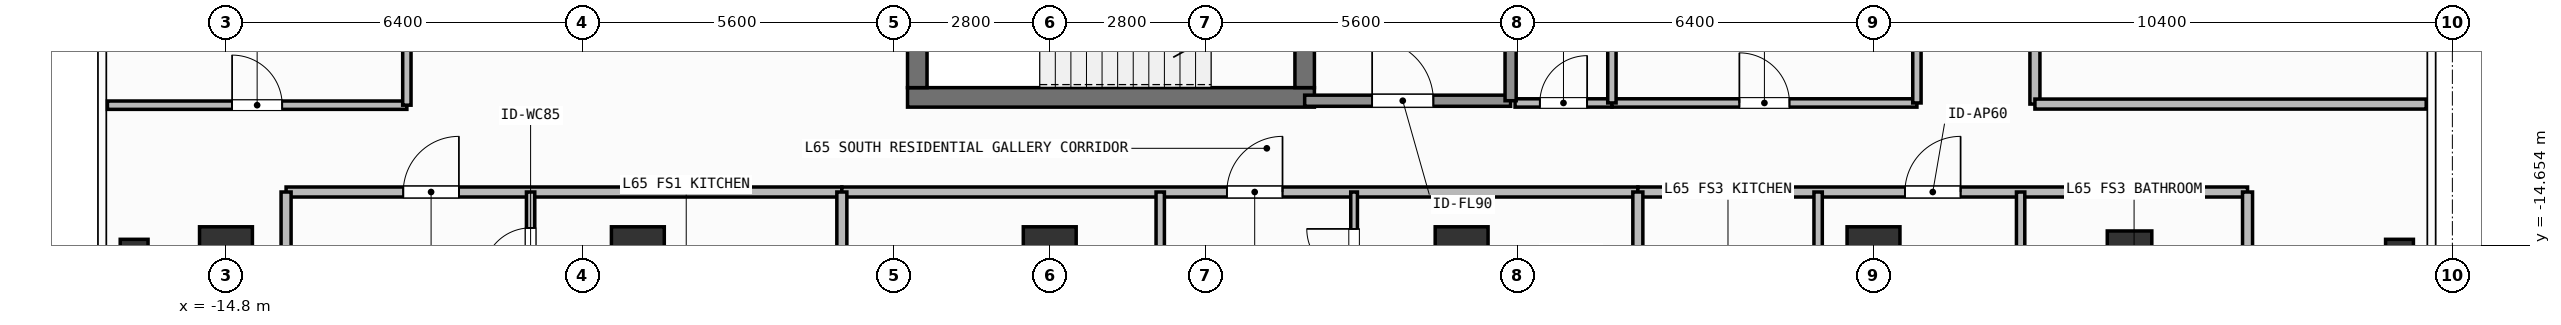
"""IFC4 building model, lengths in metres.
Left out: names, types, materials, properties, quantities, classifications, styles, units other than length and angle.
Written with IfcOpenShell. Run it as: python <this file> out.ifc"""

import sys

from ifc_helpers import new_model, si_unit, direction, frame, frame_2d, origin, origin_2d, place, context, subcontext, project, spatial, rectangle, hollow_rectangle, extrude, element, fill, save


model = new_model("IFC4")
c1 = context("Model", 3, precision=1e-05, world=origin(), true_north=direction((0.0, 1.0)))
c2 = subcontext(c1, "Body", "Model", "MODEL_VIEW")
j1 = project(units=[si_unit("LENGTHUNIT", "METRE"), si_unit("PLANEANGLEUNIT", "RADIAN")], contexts=[c1])
p1 = place(None, origin())
s1 = spatial("IfcSite", under=j1, at=p1, CompositionType="ELEMENT")
p2 = place(p1, origin())
s2 = spatial("IfcBuilding", under=s1, at=p2, CompositionType="ELEMENT")
p3 = place(p2, frame((0.0, 0.0, 266.4)))
s3 = spatial("IfcBuildingStorey", under=s2, at=p3, CompositionType="ELEMENT", Elevation=266.4)
p4 = place(p3, frame((-2.555, -12.0, 0.0), z_axis=(0.0, 0.0, 1.0), x_axis=(1.0, 0.0, 0.0)))
e1 = element("IfcWall", 1, at=p4, inside=s3, PredefinedType="SHEAR", context=c2, shape_type="SweptSolid", body=[
    extrude(rectangle(XDim=7.31, YDim=0.35, at=frame_2d((3.655, 0.0))), origin(), (0.0, 0.0, 1.0), 3.9),
])
p5 = place(p3, frame((-2.38, -11.825, 0.0), z_axis=(0.0, 0.0, 1.0), x_axis=(0.0, 1.0, 0.0)))
e2 = element("IfcWall", 2, at=p5, inside=s3, PredefinedType="SHEAR", context=c2, shape_type="SweptSolid", body=[
    extrude(rectangle(XDim=2.925, YDim=0.35, at=frame_2d((1.462, 0.0))), origin(), (0.0, 0.0, 1.0), 3.9),
])
p6 = place(p3, frame((4.58, -8.9, 0.0), z_axis=(0.0, 0.0, 1.0), x_axis=(0.0, -1.0, 0.0)))
e3 = element("IfcWall", 3, at=p6, inside=s3, PredefinedType="SHEAR", context=c2, shape_type="SweptSolid", body=[
    extrude(rectangle(XDim=2.925, YDim=0.35, at=frame_2d((1.462, 0.0))), origin(), (0.0, 0.0, 1.0), 3.9),
])
p7 = place(p6, frame((0.913, 0.0, 0.0)))
e4 = element("IfcOpeningElement", 4, at=p7, cuts=e3, PredefinedType="OPENING", context=c2, shape_type="SweptSolid", body=[
    extrude(rectangle(XDim=1.1, YDim=2.15, at=frame_2d((0.55, 1.075))), frame((0.0, 0.185, 0.0), z_axis=(0.0, -1.0, 0.0), x_axis=(1.0, 0.0, 0.0)), (0.0, 0.0, 1.0), 0.37),
])
for number, where, z_axis, x_axis in (
    (5, (-14.8, -14.8, 0.0), (0.0, 0.0, 1.0), (1.0, 0.0, 0.0)),
    (6, (-7.4, -14.8, 0.0), (0.0, 0.0, 1.0), (1.0, 0.0, 0.0)),
    (7, (0.0, -14.8, 0.0), (0.0, 0.0, 1.0), (1.0, 0.0, 0.0)),
    (8, (7.4, -14.8, 0.0), (0.0, 0.0, 1.0), (1.0, 0.0, 0.0)),
    (9, (14.8, -14.8, 0.0), (0.0, 0.0, 1.0), (1.0, 0.0, 0.0)),
):
    element("IfcColumn", number, at=place(p3, frame(where, z_axis=z_axis, x_axis=x_axis)), inside=s3, PredefinedType="COLUMN", context=c2, shape_type="SweptSolid", body=[
        extrude(rectangle(XDim=0.95, YDim=0.95, at=origin_2d()), origin(), (0.0, 0.0, 1.0), 3.9),
    ])
p8 = place(p3, frame((19.4, -14.8, 0.0), z_axis=(0.0, 0.0, 1.0), x_axis=(1.0, 0.0, 0.0)))
e10 = element("IfcColumn", 10, at=p8, inside=s3, PredefinedType="COLUMN", context=c2, shape_type="SweptSolid", body=[
    extrude(hollow_rectangle(XDim=0.8, YDim=0.8, WallThickness=0.036, at=origin_2d()), origin(), (0.0, 0.0, 1.0), 3.9),
])
for number, where, z_axis, x_axis in (
    (11, (-16.45, -14.8, 0.0), (0.0, 0.0, 1.0), (1.0, 0.0, 0.0)),
    (12, (24.25, -14.8, 0.0), (0.0, 0.0, 1.0), (1.0, 0.0, 0.0)),
):
    element("IfcColumn", number, at=place(p3, frame(where, z_axis=z_axis, x_axis=x_axis)), inside=s3, PredefinedType="COLUMN", context=c2, shape_type="SweptSolid", body=[
        extrude(hollow_rectangle(XDim=0.5, YDim=0.5, WallThickness=0.025, at=origin_2d()), origin(), (0.0, 0.0, 1.0), 3.9),
    ])
p9 = place(p3, frame((4.58, -12.06, 0.0), z_axis=(0.0, 0.0, 1.0), x_axis=(1.0, 0.0, 0.0)))
e13 = element("IfcWall", 13, at=p9, inside=s3, PredefinedType="SOLIDWALL", context=c2, shape_type="SweptSolid", body=[
    extrude(rectangle(XDim=3.7, YDim=0.2, at=frame_2d((1.85, 0.0))), origin(), (0.0, 0.0, 1.0), 3.68),
])
p10 = place(p9, frame((1.212, 0.0, 0.0)))
e14 = element("IfcOpeningElement", 14, at=p10, cuts=e13, PredefinedType="OPENING", context=c2, shape_type="SweptSolid", body=[
    extrude(rectangle(XDim=1.1, YDim=2.15, at=frame_2d((0.55, 1.075))), frame((0.0, 0.11, 0.0), z_axis=(0.0, -1.0, 0.0), x_axis=(1.0, 0.0, 0.0)), (0.0, 0.0, 1.0), 0.22),
])
p11 = place(p3, frame((8.36, -12.1, 0.0), z_axis=(0.0, 0.0, 1.0), x_axis=(1.0, 0.0, 0.0)))
e15 = element("IfcWall", 15, at=p11, inside=s3, PredefinedType="PARTITIONING", context=c2, shape_type="SweptSolid", body=[
    extrude(rectangle(XDim=1.74, YDim=0.15, at=frame_2d((0.87, 0.0))), origin(), (0.0, 0.0, 1.0), 3.68),
])
p12 = place(p11, frame((0.445, 0.0, 0.0)))
e16 = element("IfcOpeningElement", 16, at=p12, cuts=e15, PredefinedType="OPENING", context=c2, shape_type="SweptSolid", body=[
    extrude(rectangle(XDim=0.85, YDim=2.1, at=frame_2d((0.425, 1.05))), frame((0.0, 0.085, 0.0), z_axis=(0.0, -1.0, 0.0), x_axis=(1.0, 0.0, 0.0)), (0.0, 0.0, 1.0), 0.17),
])
p13 = place(p3, frame((10.1, -12.1, 0.0), z_axis=(0.0, 0.0, 1.0), x_axis=(1.0, 0.0, 0.0)))
e17 = element("IfcWall", 17, at=p13, inside=s3, PredefinedType="PARTITIONING", context=c2, shape_type="SweptSolid", body=[
    extrude(rectangle(XDim=5.48, YDim=0.15, at=frame_2d((2.74, 0.0))), origin(), (0.0, 0.0, 1.0), 3.68),
])
p14 = place(p13, frame((2.29, 0.0, 0.0)))
e18 = element("IfcOpeningElement", 18, at=p14, cuts=e17, PredefinedType="OPENING", context=c2, shape_type="SweptSolid", body=[
    extrude(rectangle(XDim=0.9, YDim=2.1, at=frame_2d((0.45, 1.05))), frame((0.0, 0.085, 0.0), z_axis=(0.0, -1.0, 0.0), x_axis=(1.0, 0.0, 0.0)), (0.0, 0.0, 1.0), 0.17),
])
p15 = place(p3, frame((-13.72, -13.7, 0.0), z_axis=(0.0, 0.0, 1.0), x_axis=(1.0, 0.0, 0.0)))
e19 = element("IfcWall", 19, at=p15, inside=s3, PredefinedType="PARTITIONING", context=c2, shape_type="SweptSolid", body=[
    extrude(rectangle(XDim=9.985, YDim=0.18, at=frame_2d((4.992, 0.0))), origin(), (0.0, 0.0, 1.0), 3.68),
])
p16 = place(p15, frame((2.105, 0.0, 0.0)))
e20 = element("IfcOpeningElement", 20, at=p16, cuts=e19, PredefinedType="OPENING", context=c2, shape_type="SweptSolid", body=[
    extrude(rectangle(XDim=1.0, YDim=2.2, at=frame_2d((0.5, 1.1))), frame((0.0, 0.1, 0.0), z_axis=(0.0, -1.0, 0.0), x_axis=(1.0, 0.0, 0.0)), (0.0, 0.0, 1.0), 0.2),
])
p17 = place(p3, frame((-9.327, -15.839, 0.0), z_axis=(0.0, 0.0, 1.0), x_axis=(0.0, 1.0, 0.0)))
e21 = element("IfcWall", 21, at=p17, inside=s3, PredefinedType="PARTITIONING", context=c2, shape_type="SweptSolid", body=[
    extrude(rectangle(XDim=2.139, YDim=0.15, at=frame_2d((1.07, 0.0))), origin(), (0.0, 0.0, 1.0), 3.68),
])
p18 = place(p17, frame((0.645, 0.0, 0.0)))
e22 = element("IfcOpeningElement", 22, at=p18, cuts=e21, PredefinedType="OPENING", context=c2, shape_type="SweptSolid", body=[
    extrude(rectangle(XDim=0.85, YDim=2.1, at=frame_2d((0.425, 1.05))), frame((0.0, 0.085, 0.0), z_axis=(0.0, -1.0, 0.0), x_axis=(1.0, 0.0, 0.0)), (0.0, 0.0, 1.0), 0.17),
])
p19 = place(p3, frame((-3.735, -13.7, 0.0), z_axis=(0.0, 0.0, 1.0), x_axis=(1.0, 0.0, 0.0)))
e23 = element("IfcWall", 23, at=p19, inside=s3, PredefinedType="PARTITIONING", context=c2, shape_type="SweptSolid", body=[
    extrude(rectangle(XDim=14.301, YDim=0.18, at=frame_2d((7.15, 0.0))), origin(), (0.0, 0.0, 1.0), 3.68),
])
p20 = place(p19, frame((6.917, 0.0, 0.0)))
e24 = element("IfcOpeningElement", 24, at=p20, cuts=e23, PredefinedType="OPENING", context=c2, shape_type="SweptSolid", body=[
    extrude(rectangle(XDim=1.0, YDim=2.2, at=frame_2d((0.5, 1.1))), frame((0.0, 0.1, 0.0), z_axis=(0.0, -1.0, 0.0), x_axis=(1.0, 0.0, 0.0)), (0.0, 0.0, 1.0), 0.2),
])
p21 = place(p3, frame((1.985, -17.524, 0.0), z_axis=(0.0, 0.0, 1.0), x_axis=(0.0, 1.0, 0.0)))
e25 = element("IfcWall", 25, at=p21, inside=s3, PredefinedType="PARTITIONING", context=c2, shape_type="SweptSolid", body=[
    extrude(rectangle(XDim=3.824, YDim=0.15, at=frame_2d((1.912, 0.0))), origin(), (0.0, 0.0, 1.0), 3.68),
])
p22 = place(p21, frame((1.398, 0.0, 0.0)))
e26 = element("IfcOpeningElement", 26, at=p22, cuts=e25, PredefinedType="OPENING", context=c2, shape_type="SweptSolid", body=[
    extrude(rectangle(XDim=0.85, YDim=2.1, at=frame_2d((0.425, 1.05))), frame((0.0, 0.085, 0.0), z_axis=(0.0, -1.0, 0.0), x_axis=(1.0, 0.0, 0.0)), (0.0, 0.0, 1.0), 0.17),
])
p23 = place(p3, frame((5.468, -15.876, 0.0), z_axis=(0.0, 0.0, 1.0), x_axis=(0.0, 1.0, 0.0)))
e27 = element("IfcWall", 27, at=p23, inside=s3, PredefinedType="PARTITIONING", context=c2, shape_type="SweptSolid", body=[
    extrude(rectangle(XDim=2.176, YDim=0.12, at=frame_2d((1.088, 0.0))), origin(), (0.0, 0.0, 1.0), 3.68),
])
p24 = place(p23, frame((0.663, 0.0, 0.0)))
e28 = element("IfcOpeningElement", 28, at=p24, cuts=e27, PredefinedType="OPENING", context=c2, shape_type="SweptSolid", body=[
    extrude(rectangle(XDim=0.85, YDim=2.1, at=frame_2d((0.425, 1.05))), frame((0.0, 0.07, 0.0), z_axis=(0.0, -1.0, 0.0), x_axis=(1.0, 0.0, 0.0)), (0.0, 0.0, 1.0), 0.14),
])
p25 = place(p3, frame((10.566, -13.7, 0.0), z_axis=(0.0, 0.0, 1.0), x_axis=(1.0, 0.0, 0.0)))
e29 = element("IfcWall", 29, at=p25, inside=s3, PredefinedType="PARTITIONING", context=c2, shape_type="SweptSolid", body=[
    extrude(rectangle(XDim=10.954, YDim=0.18, at=frame_2d((5.477, 0.0))), origin(), (0.0, 0.0, 1.0), 3.68),
])
p26 = place(p25, frame((4.799, 0.0, 0.0)))
e30 = element("IfcOpeningElement", 30, at=p26, cuts=e29, PredefinedType="OPENING", context=c2, shape_type="SweptSolid", body=[
    extrude(rectangle(XDim=1.0, YDim=2.2, at=frame_2d((0.5, 1.1))), frame((0.0, 0.1, 0.0), z_axis=(0.0, -1.0, 0.0), x_axis=(1.0, 0.0, 0.0)), (0.0, 0.0, 1.0), 0.2),
])
p27 = place(p3, frame((13.805, -17.219, 0.0), z_axis=(0.0, 0.0, 1.0), x_axis=(0.0, 1.0, 0.0)))
e31 = element("IfcWall", 31, at=p27, inside=s3, PredefinedType="PARTITIONING", context=c2, shape_type="SweptSolid", body=[
    extrude(rectangle(XDim=3.519, YDim=0.15, at=frame_2d((1.76, 0.0))), origin(), (0.0, 0.0, 1.0), 3.68),
])
p28 = place(p27, frame((0.999, 0.0, 0.0)))
e32 = element("IfcOpeningElement", 32, at=p28, cuts=e31, PredefinedType="OPENING", context=c2, shape_type="SweptSolid", body=[
    extrude(rectangle(XDim=0.85, YDim=2.1, at=frame_2d((0.425, 1.05))), frame((0.0, 0.085, 0.0), z_axis=(0.0, -1.0, 0.0), x_axis=(1.0, 0.0, 0.0)), (0.0, 0.0, 1.0), 0.17),
])
p29 = place(p3, frame((17.443, -17.219, 0.0), z_axis=(0.0, 0.0, 1.0), x_axis=(0.0, 1.0, 0.0)))
e33 = element("IfcWall", 33, at=p29, inside=s3, PredefinedType="PARTITIONING", context=c2, shape_type="SweptSolid", body=[
    extrude(rectangle(XDim=3.519, YDim=0.15, at=frame_2d((1.76, 0.0))), origin(), (0.0, 0.0, 1.0), 3.68),
])
p30 = place(p29, frame((1.334, 0.0, 0.0)))
e34 = element("IfcOpeningElement", 34, at=p30, cuts=e33, PredefinedType="OPENING", context=c2, shape_type="SweptSolid", body=[
    extrude(rectangle(XDim=0.85, YDim=2.1, at=frame_2d((0.425, 1.05))), frame((0.0, 0.085, 0.0), z_axis=(0.0, -1.0, 0.0), x_axis=(1.0, 0.0, 0.0)), (0.0, 0.0, 1.0), 0.17),
])
p31 = place(p3, frame((-16.93, -12.14, 0.0), z_axis=(0.0, 0.0, 1.0), x_axis=(1.0, 0.0, 0.0)))
e35 = element("IfcWall", 35, at=p31, inside=s3, PredefinedType="PARTITIONING", context=c2, shape_type="SweptSolid", body=[
    extrude(rectangle(XDim=5.38, YDim=0.15, at=frame_2d((2.69, 0.0))), origin(), (0.0, 0.0, 1.0), 3.68),
])
p32 = place(p31, frame((2.24, 0.0, 0.0)))
e36 = element("IfcOpeningElement", 36, at=p32, cuts=e35, PredefinedType="OPENING", context=c2, shape_type="SweptSolid", body=[
    extrude(rectangle(XDim=0.9, YDim=2.1, at=frame_2d((0.45, 1.05))), frame((0.0, 0.085, 0.0), z_axis=(0.0, -1.0, 0.0), x_axis=(1.0, 0.0, 0.0)), (0.0, 0.0, 1.0), 0.17),
])
p33 = place(p3, frame((17.7, -12.12, 0.0), z_axis=(0.0, 0.0, 1.0), x_axis=(0.0, 1.0, 0.0)))
e37 = element("IfcWall", 37, at=p33, inside=s3, PredefinedType="PARTITIONING", context=c2, shape_type="SweptSolid", body=[
    extrude(rectangle(XDim=7.353, YDim=0.18, at=frame_2d((3.677, 0.0))), origin(), (0.0, 0.0, 1.0), 3.68),
])
p34 = place(p33, frame((1.225, 0.0, 0.0)))
e38 = element("IfcOpeningElement", 38, at=p34, cuts=e37, PredefinedType="OPENING", context=c2, shape_type="SweptSolid", body=[
    extrude(rectangle(XDim=1.0, YDim=2.2, at=frame_2d((0.5, 1.1))), frame((0.0, 0.1, 0.0), z_axis=(0.0, -1.0, 0.0), x_axis=(1.0, 0.0, 0.0)), (0.0, 0.0, 1.0), 0.2),
])
p35 = place(p3, frame((8.28, -12.06, 0.0), z_axis=(0.0, 0.0, 1.0), x_axis=(0.0, 1.0, 0.0)))
e39 = element("IfcWall", 39, at=p35, inside=s3, PredefinedType="SOLIDWALL", context=c2, shape_type="SweptSolid", body=[
    extrude(rectangle(XDim=3.335, YDim=0.2, at=frame_2d((1.667, 0.0))), origin(), (0.0, 0.0, 1.0), 3.68),
])
p36 = place(p3, frame((10.1, -12.1, 0.0), z_axis=(0.0, 0.0, 1.0), x_axis=(0.0, 1.0, 0.0)))
e40 = element("IfcWall", 40, at=p36, inside=s3, PredefinedType="PARTITIONING", context=c2, shape_type="SweptSolid", body=[
    extrude(rectangle(XDim=2.35, YDim=0.15, at=frame_2d((1.175, 0.0))), origin(), (0.0, 0.0, 1.0), 3.68),
])
p37 = place(p3, frame((15.58, -12.1, 0.0), z_axis=(0.0, 0.0, 1.0), x_axis=(0.0, 1.0, 0.0)))
e41 = element("IfcWall", 41, at=p37, inside=s3, PredefinedType="PARTITIONING", context=c2, shape_type="SweptSolid", body=[
    extrude(rectangle(XDim=6.25, YDim=0.15, at=frame_2d((3.125, 0.0))), origin(), (0.0, 0.0, 1.0), 3.68),
])
for number, where, z_axis, x_axis in (
    (42, (-13.72, -19.51, 0.0), (0.0, 0.0, 1.0), (0.0, 1.0, 0.0)),
    (43, (21.52, -19.51, 0.0), (0.0, 0.0, 1.0), (0.0, 1.0, 0.0)),
):
    element("IfcWall", number, at=place(p3, frame(where, z_axis=z_axis, x_axis=x_axis)), inside=s3, PredefinedType="PARTITIONING", context=c2, shape_type="SweptSolid", body=[
        extrude(rectangle(XDim=5.81, YDim=0.18, at=frame_2d((2.905, 0.0))), origin(), (0.0, 0.0, 1.0), 3.68),
    ])
for number, where, z_axis, x_axis in (
    (44, (-3.735, -20.63, 0.0), (0.0, 0.0, 1.0), (0.0, 1.0, 0.0)),
    (45, (10.566, -20.63, 0.0), (0.0, 0.0, 1.0), (0.0, 1.0, 0.0)),
):
    element("IfcWall", number, at=place(p3, frame(where, z_axis=z_axis, x_axis=x_axis)), inside=s3, PredefinedType="PARTITIONING", context=c2, shape_type="SweptSolid", body=[
        extrude(rectangle(XDim=6.93, YDim=0.18, at=frame_2d((3.465, 0.0))), origin(), (0.0, 0.0, 1.0), 3.68),
    ])
p38 = place(p3, frame((-11.55, -12.14, 0.0), z_axis=(0.0, 0.0, 1.0), x_axis=(0.0, 1.0, 0.0)))
e46 = element("IfcWall", 46, at=p38, inside=s3, PredefinedType="PARTITIONING", context=c2, shape_type="SweptSolid", body=[
    extrude(rectangle(XDim=15.09, YDim=0.15, at=frame_2d((7.545, 0.0))), origin(), (0.0, 0.0, 1.0), 3.68),
])
p39 = place(p3, frame((17.7, -12.12, 0.0), z_axis=(0.0, 0.0, 1.0), x_axis=(1.0, 0.0, 0.0)))
e47 = element("IfcWall", 47, at=p39, inside=s3, PredefinedType="PARTITIONING", context=c2, shape_type="SweptSolid", body=[
    extrude(rectangle(XDim=7.03, YDim=0.18, at=frame_2d((3.515, 0.0))), origin(), (0.0, 0.0, 1.0), 3.68),
])
p40 = place(p10, origin())
e48 = element("IfcDoor", 48, at=p40, inside=s3, OperationType="SINGLE_SWING_LEFT", PredefinedType="DOOR", context=c2, shape_type="SweptSolid", body=[
    extrude(rectangle(XDim=1.1, YDim=2.15, at=frame_2d((0.55, 1.075))), frame((0.0, 0.025, 0.0), z_axis=(0.0, -1.0, 0.0), x_axis=(1.0, 0.0, 0.0)), (0.0, 0.0, 1.0), 0.05),
])
fill(e14, e48)
p41 = place(p12, origin())
e49 = element("IfcDoor", 49, at=p41, inside=s3, OperationType="SINGLE_SWING_RIGHT", PredefinedType="DOOR", context=c2, shape_type="SweptSolid", body=[
    extrude(rectangle(XDim=0.85, YDim=2.1, at=frame_2d((0.425, 1.05))), frame((0.0, 0.025, 0.0), z_axis=(0.0, -1.0, 0.0), x_axis=(1.0, 0.0, 0.0)), (0.0, 0.0, 1.0), 0.05),
])
fill(e16, e49)
p42 = place(p14, origin())
e50 = element("IfcDoor", 50, at=p42, inside=s3, OperationType="SINGLE_SWING_LEFT", PredefinedType="DOOR", context=c2, shape_type="SweptSolid", body=[
    extrude(rectangle(XDim=0.9, YDim=2.1, at=frame_2d((0.45, 1.05))), frame((0.0, 0.025, 0.0), z_axis=(0.0, -1.0, 0.0), x_axis=(1.0, 0.0, 0.0)), (0.0, 0.0, 1.0), 0.05),
])
fill(e18, e50)
p43 = place(p16, origin())
e51 = element("IfcDoor", 51, at=p43, inside=s3, OperationType="SINGLE_SWING_RIGHT", PredefinedType="DOOR", context=c2, shape_type="SweptSolid", body=[
    extrude(rectangle(XDim=1.0, YDim=2.2, at=frame_2d((0.5, 1.1))), frame((0.0, 0.025, 0.0), z_axis=(0.0, -1.0, 0.0), x_axis=(1.0, 0.0, 0.0)), (0.0, 0.0, 1.0), 0.05),
])
fill(e20, e51)
p44 = place(p18, origin())
e52 = element("IfcDoor", 52, at=p44, inside=s3, OperationType="SINGLE_SWING_LEFT", PredefinedType="DOOR", context=c2, shape_type="SweptSolid", body=[
    extrude(rectangle(XDim=0.85, YDim=2.1, at=frame_2d((0.425, 1.05))), frame((0.0, 0.025, 0.0), z_axis=(0.0, -1.0, 0.0), x_axis=(1.0, 0.0, 0.0)), (0.0, 0.0, 1.0), 0.05),
])
fill(e22, e52)
p45 = place(p20, origin())
e53 = element("IfcDoor", 53, at=p45, inside=s3, OperationType="SINGLE_SWING_RIGHT", PredefinedType="DOOR", context=c2, shape_type="SweptSolid", body=[
    extrude(rectangle(XDim=1.0, YDim=2.2, at=frame_2d((0.5, 1.1))), frame((0.0, 0.025, 0.0), z_axis=(0.0, -1.0, 0.0), x_axis=(1.0, 0.0, 0.0)), (0.0, 0.0, 1.0), 0.05),
])
fill(e24, e53)
p46 = place(p24, origin())
e54 = element("IfcDoor", 54, at=p46, inside=s3, OperationType="SINGLE_SWING_RIGHT", PredefinedType="DOOR", context=c2, shape_type="SweptSolid", body=[
    extrude(rectangle(XDim=0.85, YDim=2.1, at=frame_2d((0.425, 1.05))), frame((0.0, 0.025, 0.0), z_axis=(0.0, -1.0, 0.0), x_axis=(1.0, 0.0, 0.0)), (0.0, 0.0, 1.0), 0.05),
])
fill(e28, e54)
p47 = place(p26, origin())
e55 = element("IfcDoor", 55, at=p47, inside=s3, OperationType="SINGLE_SWING_RIGHT", PredefinedType="DOOR", context=c2, shape_type="SweptSolid", body=[
    extrude(rectangle(XDim=1.0, YDim=2.2, at=frame_2d((0.5, 1.1))), frame((0.0, 0.025, 0.0), z_axis=(0.0, -1.0, 0.0), x_axis=(1.0, 0.0, 0.0)), (0.0, 0.0, 1.0), 0.05),
])
fill(e30, e55)
p48 = place(p32, origin())
e56 = element("IfcDoor", 56, at=p48, inside=s3, OperationType="SINGLE_SWING_LEFT", PredefinedType="DOOR", context=c2, shape_type="SweptSolid", body=[
    extrude(rectangle(XDim=0.9, YDim=2.1, at=frame_2d((0.45, 1.05))), frame((0.0, 0.025, 0.0), z_axis=(0.0, -1.0, 0.0), x_axis=(1.0, 0.0, 0.0)), (0.0, 0.0, 1.0), 0.05),
])
fill(e36, e56)
save(model, sys.argv[1])
